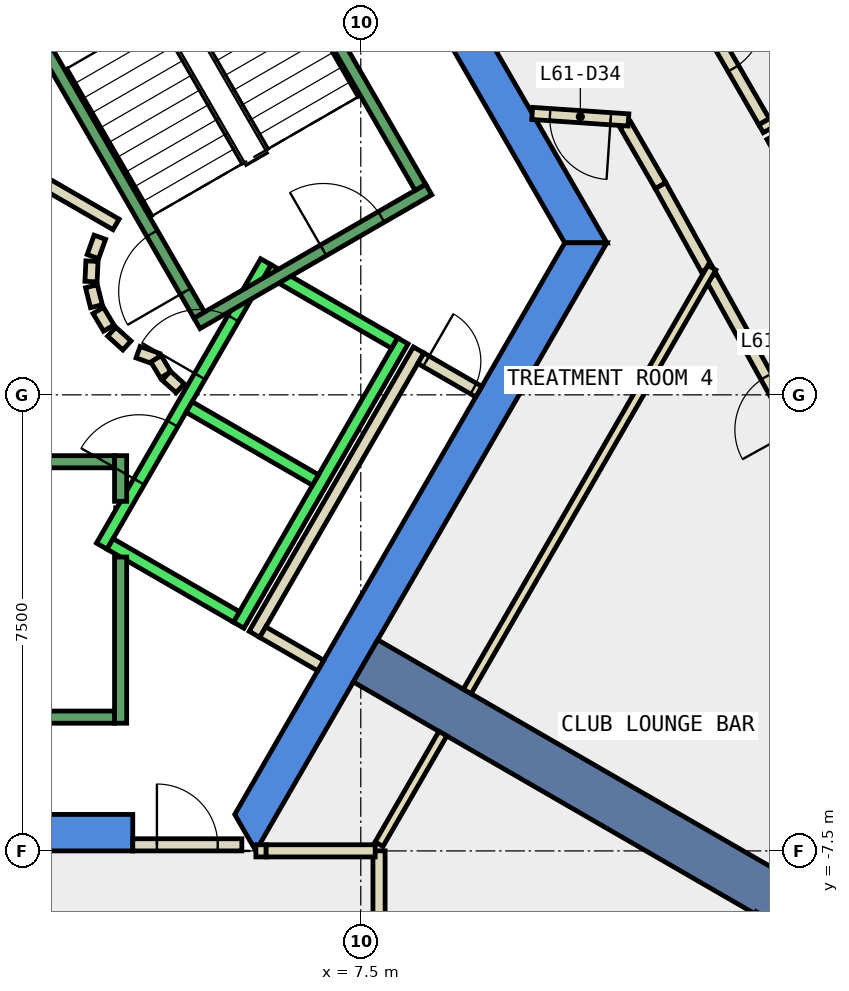
"""IFC4 building model, lengths in metres.
Left out: names, types, materials, properties, quantities, classifications, styles, units other than length and angle.
Written with IfcOpenShell. Run it as: python <this file> out.ifc"""

import sys

from ifc_helpers import new_model, si_unit, direction, frame, frame_2d, origin, place, context, subcontext, project, spatial, polyline, rectangle, outline, extrude, element, fill, save


model = new_model("IFC4")
c1 = context("Model", 3, precision=1e-05, world=origin(), true_north=direction((0.0, 1.0)))
c2 = subcontext(c1, "Body", "Model", "MODEL_VIEW")
j1 = project(units=[si_unit("LENGTHUNIT", "METRE"), si_unit("PLANEANGLEUNIT", "RADIAN")], contexts=[c1])
p1 = place(None, origin())
s1 = spatial("IfcSite", under=j1, at=p1, CompositionType="ELEMENT")
p2 = place(p1, origin())
s2 = spatial("IfcBuilding", under=s1, at=p2, CompositionType="ELEMENT")
p3 = place(p2, frame((0.0, 0.0, 266.6)))
s3 = spatial("IfcBuildingStorey", under=s2, at=p3, CompositionType="ELEMENT", Elevation=266.6)
p4 = place(p3, frame((0.0, 0.0, -0.34)))
e1 = element("IfcWall", 1, at=p4, inside=s3, PredefinedType="SHEAR", context=c2, shape_type="SweptSolid", body=[
    extrude(outline(polyline([(6.786, 10.747), (6.266, 10.447), (10.854, 2.5), (11.547, 2.5), (6.786, 10.747)])), origin(), (0.0, 0.0, 1.0), 3.6),
])
p5 = place(p3, frame((0.0, 0.0, -0.34)))
e2 = element("IfcWall", 2, at=p5, inside=s3, PredefinedType="SHEAR", context=c2, shape_type="SweptSolid", body=[
    extrude(outline(polyline([(3.75, -7.5), (3.75, -6.9), (-5.427, -6.9), (-5.774, -7.5), (3.75, -7.5)])), origin(), (0.0, 0.0, 1.0), 3.6),
])
p6 = place(p3, frame((0.0, 0.0, -0.34)))
e3 = element("IfcWall", 3, at=p6, inside=s3, PredefinedType="SHEAR", context=c2, shape_type="SweptSolid", body=[
    extrude(outline(polyline([(5.774, -7.5), (11.547, 2.5), (10.854, 2.5), (5.427, -6.9), (5.774, -7.5)])), origin(), (0.0, 0.0, 1.0), 3.6),
])
p7 = place(p3, frame((7.578, -4.375, -0.34), z_axis=(0.0, 0.0, 1.0), x_axis=(0.866024315419, -0.5000018851, 0.0)))
e4 = element("IfcWall", 4, at=p7, inside=s3, PredefinedType="SHEAR", context=c2, shape_type="SweptSolid", body=[
    extrude(rectangle(XDim=9.0, YDim=0.8, at=frame_2d((4.5, 0.0))), origin(), (0.0, 0.0, 1.0), 3.6),
])
p8 = place(p3, frame((13.188, 2.071, 0.0), z_axis=(0.0, 0.0, 1.0), x_axis=(-0.484398936474, 0.874847226859, 0.0)))
e5 = element("IfcWall", 5, at=p8, inside=s3, PredefinedType="PARTITIONING", context=c2, shape_type="SweptSolid", body=[
    extrude(rectangle(XDim=1.567, YDim=0.2, at=frame_2d((0.783, 0.0))), origin(), (0.0, 0.0, 1.0), 3.26),
])
p9 = place(p3, frame((12.429, 3.442, 0.0), z_axis=(0.0, 0.0, 1.0), x_axis=(-0.500076612374, 0.865981167091, 0.0)))
e6 = element("IfcWall", 6, at=p9, inside=s3, PredefinedType="PARTITIONING", context=c2, shape_type="SweptSolid", body=[
    extrude(rectangle(XDim=1.154, YDim=0.2, at=frame_2d((0.577, 0.0))), origin(), (0.0, 0.0, 1.0), 3.26),
])
p10 = place(p3, frame((11.902, 4.521, 0.0), z_axis=(0.0, 0.0, 1.0), x_axis=(-0.997726217037, 0.067397298437, 0.0)))
e7 = element("IfcWall", 7, at=p10, inside=s3, PredefinedType="PARTITIONING", context=c2, shape_type="SweptSolid", body=[
    extrude(rectangle(XDim=1.587, YDim=0.2, at=frame_2d((0.793, 0.0))), origin(), (0.0, 0.0, 1.0), 3.26),
])
p11 = place(p10, frame((0.293, 0.0, 0.0)))
e8 = element("IfcOpeningElement", 8, at=p11, cuts=e7, PredefinedType="OPENING", context=c2, shape_type="SweptSolid", body=[
    extrude(rectangle(XDim=1.0, YDim=2.1, at=frame_2d((0.5, 1.05))), frame((0.0, 0.11, 0.0), z_axis=(0.0, -1.0, 0.0), x_axis=(1.0, 0.0, 0.0)), (0.0, 0.0, 1.0), 0.22),
])
p12 = place(p3, frame((15.56, -2.214, 0.0), z_axis=(0.0, 0.0, 1.0), x_axis=(-0.484323615817, 0.874888927329, 0.0)))
e9 = element("IfcWall", 9, at=p12, inside=s3, PredefinedType="PARTITIONING", context=c2, shape_type="SweptSolid", body=[
    extrude(rectangle(XDim=4.747, YDim=0.2, at=frame_2d((2.374, 0.0))), origin(), (0.0, 0.0, 1.0), 3.26),
])
p13 = place(p12, frame((1.874, 0.0, 0.0)))
e10 = element("IfcOpeningElement", 10, at=p13, cuts=e9, PredefinedType="OPENING", context=c2, shape_type="SweptSolid", body=[
    extrude(rectangle(XDim=1.0, YDim=2.1, at=frame_2d((0.5, 1.05))), frame((0.0, 0.11, 0.0), z_axis=(0.0, -1.0, 0.0), x_axis=(1.0, 0.0, 0.0)), (0.0, 0.0, 1.0), 0.22),
])
p14 = place(p3, frame((14.267, 4.25, 0.0), z_axis=(0.0, 0.0, 1.0), x_axis=(0.4843920198, -0.874851056554, 0.0)))
e11 = element("IfcWall", 11, at=p14, inside=s3, PredefinedType="PARTITIONING", context=c2, shape_type="SweptSolid", body=[
    extrude(rectangle(XDim=3.199, YDim=0.2, at=frame_2d((1.6, 0.0))), origin(), (0.0, 0.0, 1.0), 3.26),
])
p15 = place(p3, frame((12.62, 7.111, 0.0), z_axis=(0.0, 0.0, 1.0), x_axis=(0.499950733426, -0.866053845986, 0.0)))
e12 = element("IfcWall", 12, at=p15, inside=s3, PredefinedType="PARTITIONING", context=c2, shape_type="SweptSolid", body=[
    extrude(rectangle(XDim=3.024, YDim=0.2, at=frame_2d((1.512, 0.0))), origin(), (0.0, 0.0, 1.0), 3.26),
])
p16 = place(p15, frame((1.013, 0.0, 0.0)))
e13 = element("IfcOpeningElement", 13, at=p16, cuts=e12, PredefinedType="OPENING", context=c2, shape_type="SweptSolid", body=[
    extrude(rectangle(XDim=1.0, YDim=2.1, at=frame_2d((0.5, 1.05))), frame((0.0, 0.11, 0.0), z_axis=(0.0, -1.0, 0.0), x_axis=(1.0, 0.0, 0.0)), (0.0, 0.0, 1.0), 0.22),
])
p17 = place(p3, frame((5.751, -3.938, 0.0), z_axis=(0.0, 0.0, 1.0), x_axis=(0.500034260056, 0.866005622828, 0.0)))
e14 = element("IfcWall", 14, at=p17, inside=s3, PredefinedType="PARTITIONING", context=c2, shape_type="SweptSolid", body=[
    extrude(rectangle(XDim=5.399, YDim=0.2, at=frame_2d((2.7, 0.0))), origin(), (0.0, 0.0, 1.0), 3.26),
])
p18 = place(p3, frame((8.488, 0.602, 0.0), z_axis=(0.0, 0.0, 1.0), x_axis=(0.866063652425, -0.499933745558, 0.0)))
e15 = element("IfcWall", 15, at=p18, inside=s3, PredefinedType="PARTITIONING", context=c2, shape_type="SweptSolid", body=[
    extrude(rectangle(XDim=1.1, YDim=0.2, at=frame_2d((0.55, 0.0))), origin(), (0.0, 0.0, 1.0), 3.26),
])
p19 = place(p18, frame((0.1, 0.0, 0.0)))
e16 = element("IfcOpeningElement", 16, at=p19, cuts=e15, PredefinedType="OPENING", context=c2, shape_type="SweptSolid", body=[
    extrude(rectangle(XDim=0.9, YDim=2.1, at=frame_2d((0.45, 1.05))), frame((0.0, 0.11, 0.0), z_axis=(0.0, -1.0, 0.0), x_axis=(1.0, 0.0, 0.0)), (0.0, 0.0, 1.0), 0.22),
])
p20 = place(p3, frame((6.841, -4.452, 0.0), z_axis=(0.0, 0.0, 1.0), x_axis=(-0.86621513555, 0.499671230855, 0.0)))
e17 = element("IfcWall", 17, at=p20, inside=s3, PredefinedType="PARTITIONING", context=c2, shape_type="SweptSolid", body=[
    extrude(rectangle(XDim=1.1, YDim=0.2, at=frame_2d((0.55, 0.0))), origin(), (0.0, 0.0, 1.0), 3.26),
])
p21 = place(p3, frame((5.775, -7.499, 0.0), z_axis=(0.0, 0.0, 1.0), x_axis=(1.0, 0.0, 0.0)))
e18 = element("IfcWall", 18, at=p21, inside=s3, PredefinedType="PARTITIONING", context=c2, shape_type="SweptSolid", body=[
    extrude(rectangle(XDim=0.169, YDim=0.2, at=frame_2d((0.084, 0.0))), origin(), (0.0, 0.0, 1.0), 2.4),
])
p22 = place(p3, frame((7.8, -7.39, 0.0), z_axis=(0.0, 0.0, 1.0), x_axis=(0.499977374825, 0.866038466041, 0.0)))
e19 = element("IfcWall", 19, at=p22, inside=s3, PredefinedType="PARTITIONING", context=c2, shape_type="SweptSolid", body=[
    extrude(rectangle(XDim=2.1, YDim=0.15, at=frame_2d((1.05, 0.0))), origin(), (0.0, 0.0, 1.0), 3.26),
])
p23 = place(p3, frame((1.866, 3.732, 0.0), z_axis=(0.0, 0.0, 1.0), x_axis=(0.866043361281, -0.499968895414, 0.0)))
e20 = element("IfcWall", 20, at=p23, inside=s3, PredefinedType="PARTITIONING", context=c2, shape_type="SweptSolid", body=[
    extrude(rectangle(XDim=1.858, YDim=0.2, at=frame_2d((0.929, 0.0))), origin(), (0.0, 0.0, 1.0), 3.26),
])
p24 = place(p3, frame((3.208, 2.592, 0.0), z_axis=(0.0, 0.0, 1.0), x_axis=(-0.337388820924, -0.941365382578, 0.0)))
e21 = element("IfcWall", 21, at=p24, inside=s3, PredefinedType="PARTITIONING", context=c2, shape_type="SweptSolid", body=[
    extrude(rectangle(XDim=0.338, YDim=0.2, at=frame_2d((0.169, 0.0))), origin(), (0.0, 0.0, 1.0), 3.26),
])
p25 = place(p3, frame((3.079, 2.199, 0.0), z_axis=(0.0, 0.0, 1.0), x_axis=(-0.047771483479, -0.998858290933, 0.0)))
e22 = element("IfcWall", 22, at=p25, inside=s3, PredefinedType="PARTITIONING", context=c2, shape_type="SweptSolid", body=[
    extrude(rectangle(XDim=0.337, YDim=0.2, at=frame_2d((0.169, 0.0))), origin(), (0.0, 0.0, 1.0), 3.26),
])
p26 = place(p3, frame((3.07, 1.786, 0.0), z_axis=(0.0, 0.0, 1.0), x_axis=(0.242705583207, -0.970099994784, 0.0)))
e23 = element("IfcWall", 23, at=p26, inside=s3, PredefinedType="PARTITIONING", context=c2, shape_type="SweptSolid", body=[
    extrude(rectangle(XDim=0.338, YDim=0.2, at=frame_2d((0.169, 0.0))), origin(), (0.0, 0.0, 1.0), 3.26),
])
for number, where, z_axis, x_axis in (
    (24, (3.182, 1.388, 0.0), (0.0, 0.0, 1.0), (0.512, -0.859, 0.0)),
    (25, (3.404, 1.039, 0.0), (0.0, 0.0, 1.0), (0.74, -0.672, 0.0)),
):
    element("IfcWall", number, at=place(p3, frame(where, z_axis=z_axis, x_axis=x_axis)), inside=s3, PredefinedType="PARTITIONING", context=c2, shape_type="SweptSolid", body=[
        extrude(rectangle(XDim=0.338, YDim=0.2, at=frame_2d((0.169, 0.0))), origin(), (0.0, 0.0, 1.0), 3.26),
    ])
p27 = place(p3, frame((3.838, 0.702, 0.0), z_axis=(0.0, 0.0, 1.0), x_axis=(0.941035081519, -0.338308993895, 0.0)))
e26 = element("IfcWall", 26, at=p27, inside=s3, PredefinedType="PARTITIONING", context=c2, shape_type="SweptSolid", body=[
    extrude(rectangle(XDim=0.337, YDim=0.2, at=frame_2d((0.168, 0.0))), origin(), (0.0, 0.0, 1.0), 3.26),
])
p28 = place(p3, frame((4.132, 0.593, 0.0), z_axis=(0.0, 0.0, 1.0), x_axis=(0.513561617048, -0.858052717201, 0.0)))
e27 = element("IfcWall", 27, at=p28, inside=s3, PredefinedType="PARTITIONING", context=c2, shape_type="SweptSolid", body=[
    extrude(rectangle(XDim=0.308, YDim=0.2, at=frame_2d((0.154, 0.0))), origin(), (0.0, 0.0, 1.0), 3.26),
])
p29 = place(p3, frame((4.301, 0.315, 0.0), z_axis=(0.0, 0.0, 1.0), x_axis=(0.741798017506, -0.670623367639, 0.0)))
e28 = element("IfcWall", 28, at=p29, inside=s3, PredefinedType="PARTITIONING", context=c2, shape_type="SweptSolid", body=[
    extrude(rectangle(XDim=0.309, YDim=0.2, at=frame_2d((0.154, 0.0))), origin(), (0.0, 0.0, 1.0), 3.26),
])
p30 = place(p3, frame((7.8, -7.499, 0.0), z_axis=(0.0, 0.0, 1.0), x_axis=(0.0, -1.0, 0.0)))
e29 = element("IfcWall", 29, at=p30, inside=s3, PredefinedType="PARTITIONING", context=c2, shape_type="SweptSolid", body=[
    extrude(rectangle(XDim=5.465, YDim=0.2, at=frame_2d((2.732, 0.0))), origin(), (0.0, 0.0, 1.0), 3.26),
])
p31 = place(p3, frame((14.067, -8.536, 0.0), z_axis=(0.0, 0.0, 1.0), x_axis=(-0.500100941679, -0.865967117235, 0.0)))
e30 = element("IfcWall", 30, at=p31, inside=s3, PredefinedType="PARTITIONING", context=c2, shape_type="SweptSolid", body=[
    extrude(rectangle(XDim=4.951, YDim=0.15, at=frame_2d((2.475, 0.0))), origin(), (0.0, 0.0, 1.0), 3.26),
])
p32 = place(p3, frame((14.083, 4.377, 0.0), z_axis=(0.0, 0.0, 1.0), x_axis=(0.870415885751, 0.492317159799, 0.0)))
e31 = element("IfcWall", 31, at=p32, inside=s3, PredefinedType="PARTITIONING", context=c2, shape_type="SweptSolid", body=[
    extrude(rectangle(XDim=4.581, YDim=0.15, at=frame_2d((2.29, 0.0))), origin(), (0.0, 0.0, 1.0), 3.26),
])
p33 = place(p3, frame((3.75, -7.4, 0.0), z_axis=(0.0, 0.0, 1.0), x_axis=(1.0, 0.0, 0.0)))
e32 = element("IfcWall", 32, at=p33, inside=s3, PredefinedType="PARTITIONING", context=c2, shape_type="SweptSolid", body=[
    extrude(rectangle(XDim=1.794, YDim=0.2, at=frame_2d((0.897, 0.0))), origin(), (0.0, 0.0, 1.0), 2.4),
])
p34 = place(p33, frame((0.397, 0.0, 0.0)))
e33 = element("IfcOpeningElement", 33, at=p34, cuts=e32, PredefinedType="OPENING", context=c2, shape_type="SweptSolid", body=[
    extrude(rectangle(XDim=1.0, YDim=2.1, at=frame_2d((0.5, 1.05))), frame((0.0, 0.11, 0.0), z_axis=(0.0, -1.0, 0.0), x_axis=(1.0, 0.0, 0.0)), (0.0, 0.0, 1.0), 0.22),
])
p35 = place(p3, frame((9.25, -4.878, 0.0), z_axis=(0.0, 0.0, 1.0), x_axis=(0.499982416899, 0.866035555154, 0.0)))
e34 = element("IfcWall", 34, at=p35, inside=s3, PredefinedType="PARTITIONING", context=c2, shape_type="SweptSolid", body=[
    extrude(rectangle(XDim=8.048, YDim=0.15, at=frame_2d((4.024, 0.0))), origin(), (0.0, 0.0, 1.0), 3.26),
])
p36 = place(p3, frame((5.944, -7.499, 0.0), z_axis=(0.0, 0.0, 1.0), x_axis=(1.0, 0.0, 0.0)))
e35 = element("IfcWall", 35, at=p36, inside=s3, PredefinedType="PARTITIONING", context=c2, shape_type="SweptSolid", body=[
    extrude(rectangle(XDim=1.793, YDim=0.2, at=frame_2d((0.896, 0.0))), origin(), (0.0, 0.0, 1.0), 3.26),
])
p37 = place(p3, frame((3.24, -2.488, 0.0), z_axis=(0.0, 0.0, 1.0), x_axis=(0.500034260056, 0.866005622828, 0.0)))
e36 = element("IfcWall", 36, at=p37, inside=s3, PredefinedType="STANDARD", context=c2, shape_type="SweptSolid", body=[
    extrude(rectangle(XDim=5.399, YDim=0.2, at=frame_2d((2.7, 0.0))), origin(), (0.0, 0.0, 1.0), 3.26),
])
p38 = place(p37, frame((3.225, 0.0, 0.0)))
e37 = element("IfcOpeningElement", 37, at=p38, cuts=e36, PredefinedType="OPENING", context=c2, shape_type="SweptSolid", body=[
    extrude(rectangle(XDim=1.1, YDim=2.1, at=frame_2d((0.55, 1.05))), frame((0.0, 0.11, 0.0), z_axis=(0.0, -1.0, 0.0), x_axis=(1.0, 0.0, 0.0)), (0.0, 0.0, 1.0), 0.22),
])
p39 = place(p37, frame((1.225, 0.0, 0.0)))
e38 = element("IfcOpeningElement", 38, at=p39, cuts=e36, PredefinedType="OPENING", context=c2, shape_type="SweptSolid", body=[
    extrude(rectangle(XDim=1.1, YDim=2.1, at=frame_2d((0.55, 1.05))), frame((0.0, 0.11, 0.0), z_axis=(0.0, -1.0, 0.0), x_axis=(1.0, 0.0, 0.0)), (0.0, 0.0, 1.0), 0.22),
])
p40 = place(p3, frame((5.492, -3.788, 0.0), z_axis=(0.0, 0.0, 1.0), x_axis=(0.500034260056, 0.866005622828, 0.0)))
e39 = element("IfcWall", 39, at=p40, inside=s3, PredefinedType="STANDARD", context=c2, shape_type="SweptSolid", body=[
    extrude(rectangle(XDim=5.399, YDim=0.2, at=frame_2d((2.7, 0.0))), origin(), (0.0, 0.0, 1.0), 3.26),
])
p41 = place(p3, frame((3.377, -2.452, 0.0), z_axis=(0.0, 0.0, 1.0), x_axis=(0.865955154139, -0.50012165622, 0.0)))
e40 = element("IfcWall", 40, at=p41, inside=s3, PredefinedType="STANDARD", context=c2, shape_type="SweptSolid", body=[
    extrude(rectangle(XDim=2.4, YDim=0.2, at=frame_2d((1.2, 0.0))), origin(), (0.0, 0.0, 1.0), 3.26),
])
for number, where, z_axis, x_axis in (
    (41, (4.677, -0.2, 0.0), (0.0, 0.0, 1.0), (0.866, -0.5, 0.0)),
    (42, (5.977, 2.052, 0.0), (0.0, 0.0, 1.0), (0.866, -0.5, 0.0)),
):
    element("IfcWall", number, at=place(p3, frame(where, z_axis=z_axis, x_axis=x_axis)), inside=s3, PredefinedType="STANDARD", context=c2, shape_type="SweptSolid", body=[
        extrude(rectangle(XDim=2.399, YDim=0.2, at=frame_2d((1.2, 0.0))), origin(), (0.0, 0.0, 1.0), 3.26),
    ])
p42 = place(p3, frame((3.55, -2.667, 0.0), z_axis=(0.0, 0.0, 1.0), x_axis=(0.0, -1.0, 0.0)))
e43 = element("IfcWall", 43, at=p42, inside=s3, PredefinedType="STANDARD", context=c2, shape_type="SweptSolid", body=[
    extrude(rectangle(XDim=2.733, YDim=0.2, at=frame_2d((1.366, 0.0))), origin(), (0.0, 0.0, 1.0), 3.26),
])
p43 = place(p3, frame((3.55, -1.0, 0.0), z_axis=(0.0, 0.0, 1.0), x_axis=(0.0, -1.0, 0.0)))
e44 = element("IfcWall", 44, at=p43, inside=s3, PredefinedType="STANDARD", context=c2, shape_type="SweptSolid", body=[
    extrude(rectangle(XDim=0.751, YDim=0.2, at=frame_2d((0.375, 0.0))), origin(), (0.0, 0.0, 1.0), 3.26),
])
p44 = place(p3, frame((-3.45, -1.1, 0.0), z_axis=(0.0, 0.0, 1.0), x_axis=(1.0, 0.0, 0.0)))
e45 = element("IfcWall", 45, at=p44, inside=s3, PredefinedType="STANDARD", context=c2, shape_type="SweptSolid", body=[
    extrude(rectangle(XDim=6.9, YDim=0.2, at=frame_2d((3.45, 0.0))), origin(), (0.0, 0.0, 1.0), 3.26),
])
p45 = place(p44, frame((0.45, 0.0, 0.0)))
e46 = element("IfcOpeningElement", 46, at=p45, cuts=e45, PredefinedType="OPENING", context=c2, shape_type="SweptSolid", body=[
    extrude(rectangle(XDim=1.1, YDim=2.2, at=frame_2d((0.55, 1.1))), frame((0.0, 0.11, 0.0), z_axis=(0.0, -1.0, 0.0), x_axis=(1.0, 0.0, 0.0)), (0.0, 0.0, 1.0), 0.22),
])
p46 = place(p3, frame((-3.45, -5.3, 0.0), z_axis=(0.0, 0.0, 1.0), x_axis=(1.0, 0.0, 0.0)))
e47 = element("IfcWall", 47, at=p46, inside=s3, PredefinedType="STANDARD", context=c2, shape_type="SweptSolid", body=[
    extrude(rectangle(XDim=6.9, YDim=0.2, at=frame_2d((3.45, 0.0))), origin(), (0.0, 0.0, 1.0), 3.26),
])
p47 = place(p3, frame((4.806, 1.176, 0.0), z_axis=(0.0, 0.0, 1.0), x_axis=(0.866059941101, 0.499940174841, 0.0)))
e48 = element("IfcWall", 48, at=p47, inside=s3, PredefinedType="STANDARD", context=c2, shape_type="SweptSolid", body=[
    extrude(rectangle(XDim=4.4, YDim=0.2, at=frame_2d((2.2, 0.0))), origin(), (0.0, 0.0, 1.0), 3.26),
])
p48 = place(p47, frame((2.4, 0.0, 0.0)))
e49 = element("IfcOpeningElement", 49, at=p48, cuts=e48, PredefinedType="OPENING", context=c2, shape_type="SweptSolid", body=[
    extrude(rectangle(XDim=1.1, YDim=2.2, at=frame_2d((0.55, 1.1))), frame((0.0, 0.11, 0.0), z_axis=(0.0, -1.0, 0.0), x_axis=(1.0, 0.0, 0.0)), (0.0, 0.0, 1.0), 0.22),
])
p49 = place(p3, frame((4.843, 1.312, 0.0), z_axis=(0.0, 0.0, 1.0), x_axis=(-0.499963383562, 0.866046543262, 0.0)))
e50 = element("IfcWall", 50, at=p49, inside=s3, PredefinedType="STANDARD", context=c2, shape_type="SweptSolid", body=[
    extrude(rectangle(XDim=6.9, YDim=0.2, at=frame_2d((3.45, 0.0))), origin(), (0.0, 0.0, 1.0), 3.26),
])
p50 = place(p49, frame((0.45, 0.0, 0.0)))
e51 = element("IfcOpeningElement", 51, at=p50, cuts=e50, PredefinedType="OPENING", context=c2, shape_type="SweptSolid", body=[
    extrude(rectangle(XDim=1.1, YDim=2.2, at=frame_2d((0.55, 1.1))), frame((0.0, 0.11, 0.0), z_axis=(0.0, -1.0, 0.0), x_axis=(1.0, 0.0, 0.0)), (0.0, 0.0, 1.0), 0.22),
])
p51 = place(p3, frame((8.48, 3.412, 0.0), z_axis=(0.0, 0.0, 1.0), x_axis=(-0.499978703459, 0.866037698999, 0.0)))
e52 = element("IfcWall", 52, at=p51, inside=s3, PredefinedType="STANDARD", context=c2, shape_type="SweptSolid", body=[
    extrude(rectangle(XDim=6.9, YDim=0.2, at=frame_2d((3.45, 0.0))), origin(), (0.0, 0.0, 1.0), 3.26),
])
p52 = place(p16, origin())
e53 = element("IfcDoor", 53, at=p52, inside=s3, OperationType="SINGLE_SWING_LEFT", PredefinedType="DOOR", context=c2, shape_type="SweptSolid", body=[
    extrude(rectangle(XDim=1.0, YDim=2.1, at=frame_2d((0.5, 1.05))), frame((0.0, 0.025, 0.0), z_axis=(0.0, -1.0, 0.0), x_axis=(1.0, 0.0, 0.0)), (0.0, 0.0, 1.0), 0.05),
])
fill(e13, e53)
p53 = place(p13, origin())
e54 = element("IfcDoor", 54, at=p53, inside=s3, OperationType="SINGLE_SWING_LEFT", PredefinedType="DOOR", context=c2, shape_type="SweptSolid", body=[
    extrude(rectangle(XDim=1.0, YDim=2.1, at=frame_2d((0.5, 1.05))), frame((0.0, 0.025, 0.0), z_axis=(0.0, -1.0, 0.0), x_axis=(1.0, 0.0, 0.0)), (0.0, 0.0, 1.0), 0.05),
])
fill(e10, e54)
p54 = place(p11, origin())
e55 = element("IfcDoor", 55, at=p54, inside=s3, OperationType="SINGLE_SWING_LEFT", PredefinedType="DOOR", context=c2, shape_type="SweptSolid", body=[
    extrude(rectangle(XDim=1.0, YDim=2.1, at=frame_2d((0.5, 1.05))), frame((0.0, 0.025, 0.0), z_axis=(0.0, -1.0, 0.0), x_axis=(1.0, 0.0, 0.0)), (0.0, 0.0, 1.0), 0.05),
])
fill(e8, e55)
p55 = place(p19, origin())
e56 = element("IfcDoor", 56, at=p55, inside=s3, OperationType="SINGLE_SWING_RIGHT", PredefinedType="DOOR", context=c2, shape_type="SweptSolid", body=[
    extrude(rectangle(XDim=0.9, YDim=2.1, at=frame_2d((0.45, 1.05))), frame((0.0, 0.025, 0.0), z_axis=(0.0, -1.0, 0.0), x_axis=(1.0, 0.0, 0.0)), (0.0, 0.0, 1.0), 0.05),
])
fill(e16, e56)
p56 = place(p34, origin())
e57 = element("IfcDoor", 57, at=p56, inside=s3, OperationType="SINGLE_SWING_LEFT", PredefinedType="DOOR", context=c2, shape_type="SweptSolid", body=[
    extrude(rectangle(XDim=1.0, YDim=2.1, at=frame_2d((0.5, 1.05))), frame((0.0, 0.025, 0.0), z_axis=(0.0, -1.0, 0.0), x_axis=(1.0, 0.0, 0.0)), (0.0, 0.0, 1.0), 0.05),
])
fill(e33, e57)
p57 = place(p38, origin())
e58 = element("IfcDoor", 58, at=p57, inside=s3, OperationType="SLIDING_TO_LEFT", PredefinedType="DOOR", context=c2, shape_type="SweptSolid", body=[
    extrude(rectangle(XDim=1.1, YDim=2.1, at=frame_2d((0.55, 1.05))), frame((0.0, 0.025, 0.0), z_axis=(0.0, -1.0, 0.0), x_axis=(1.0, 0.0, 0.0)), (0.0, 0.0, 1.0), 0.05),
])
fill(e37, e58)
p58 = place(p39, origin())
e59 = element("IfcDoor", 59, at=p58, inside=s3, OperationType="SLIDING_TO_LEFT", PredefinedType="DOOR", context=c2, shape_type="SweptSolid", body=[
    extrude(rectangle(XDim=1.1, YDim=2.1, at=frame_2d((0.55, 1.05))), frame((0.0, 0.025, 0.0), z_axis=(0.0, -1.0, 0.0), x_axis=(1.0, 0.0, 0.0)), (0.0, 0.0, 1.0), 0.05),
])
fill(e38, e59)
p59 = place(p50, origin())
e60 = element("IfcDoor", 60, at=p59, inside=s3, OperationType="SINGLE_SWING_LEFT", PredefinedType="DOOR", context=c2, shape_type="SweptSolid", body=[
    extrude(rectangle(XDim=1.1, YDim=2.2, at=frame_2d((0.55, 1.1))), frame((0.0, 0.025, 0.0), z_axis=(0.0, -1.0, 0.0), x_axis=(1.0, 0.0, 0.0)), (0.0, 0.0, 1.0), 0.05),
])
fill(e51, e60)
p60 = place(p48, origin())
e61 = element("IfcDoor", 61, at=p60, inside=s3, OperationType="SINGLE_SWING_LEFT", PredefinedType="DOOR", context=c2, shape_type="SweptSolid", body=[
    extrude(rectangle(XDim=1.1, YDim=2.2, at=frame_2d((0.55, 1.1))), frame((0.0, 0.025, 0.0), z_axis=(0.0, -1.0, 0.0), x_axis=(1.0, 0.0, 0.0)), (0.0, 0.0, 1.0), 0.05),
])
fill(e49, e61)
save(model, sys.argv[1])
